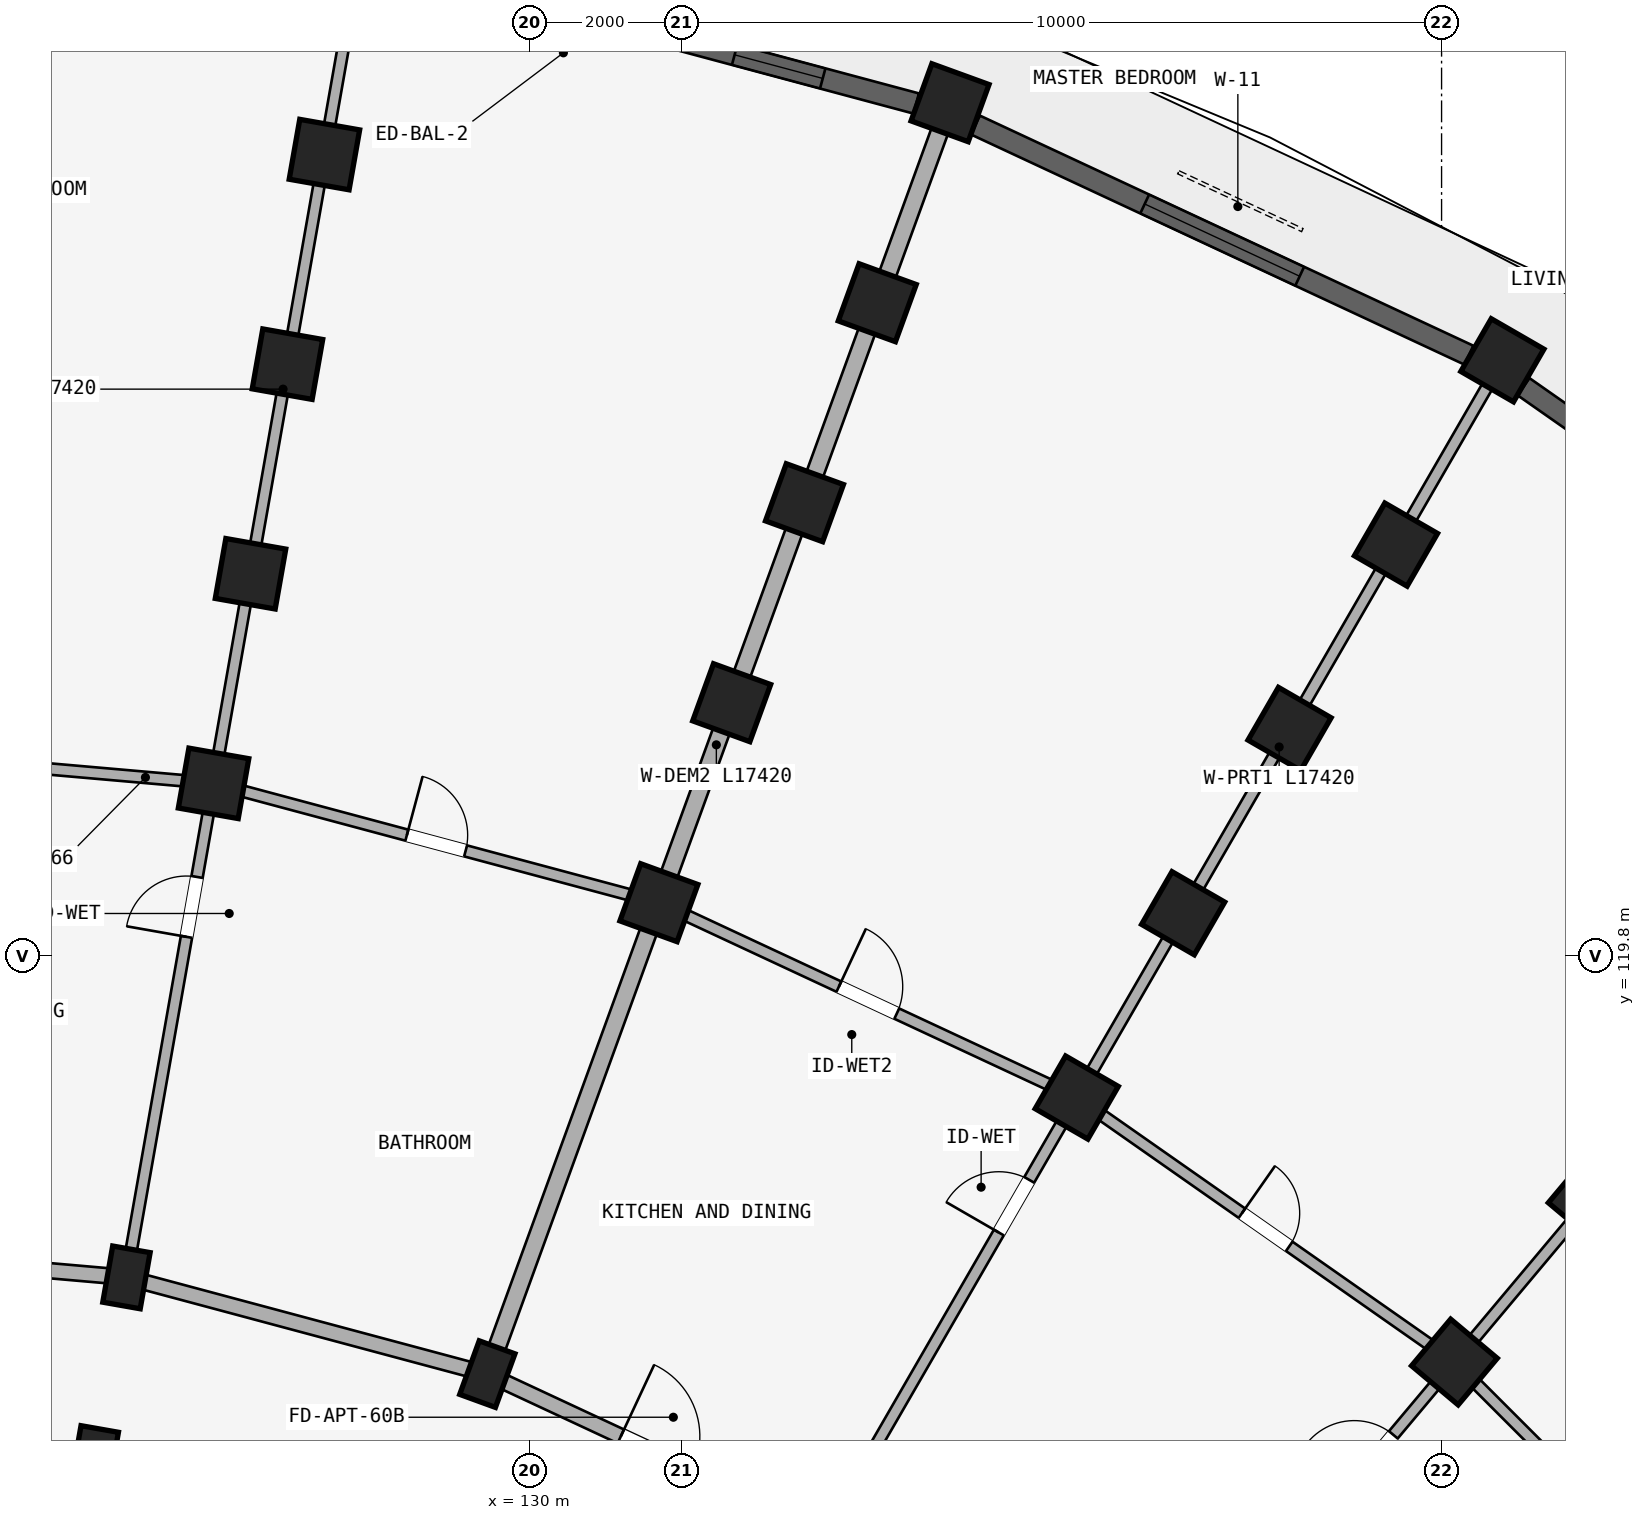
"""IFC4 building model, lengths in metres.
Left out: names, types, materials, properties, quantities, classifications, styles, units other than length and angle.
Written with IfcOpenShell. Run it as: python <this file> out.ifc"""

import sys

from ifc_helpers import new_model, si_unit, direction, frame, frame_2d, origin, origin_2d, place, context, subcontext, project, spatial, rectangle, extrude, element, fill, save


model = new_model("IFC4")
c1 = context("Model", 3, precision=1e-05, world=origin(), true_north=direction((0.0, 1.0)))
c2 = subcontext(c1, "Body", "Model", "MODEL_VIEW")
j1 = project(units=[si_unit("LENGTHUNIT", "METRE"), si_unit("PLANEANGLEUNIT", "RADIAN")], contexts=[c1])
p1 = place(None, origin())
s1 = spatial("IfcSite", under=j1, at=p1, CompositionType="ELEMENT")
p2 = place(p1, origin())
s2 = spatial("IfcBuilding", under=s1, at=p2, CompositionType="ELEMENT")
p3 = place(p2, frame((0.0, 0.0, 8.7)))
s3 = spatial("IfcBuildingStorey", under=s2, at=p3, CompositionType="ELEMENT", Elevation=8.7)
for number, where, z_axis, x_axis in (
    (1, (124.28, 113.208, 0.0), (0.0, 0.0, 1.0), (-0.985, 0.174, 0.0)),
    (2, (124.697, 115.572, 0.0), (0.0, 0.0, 1.0), (-0.985, 0.174, 0.0)),
):
    element("IfcColumn", number, at=place(p3, frame(where, z_axis=z_axis, x_axis=x_axis)), inside=s3, PredefinedType="COLUMN", context=c2, shape_type="SweptSolid", body=[
        extrude(rectangle(XDim=0.5, YDim=0.75, at=origin_2d()), origin(), (0.0, 0.0, 1.0), 2.93),
    ])
for number, where, z_axis, x_axis in (
    (3, (125.843, 122.071, 0.0), (0.0, 0.0, 1.0), (-0.985, 0.174, 0.0)),
    (4, (126.329, 124.829, 0.0), (0.0, 0.0, 1.0), (-0.985, 0.174, 0.0)),
    (5, (126.815, 127.586, 0.0), (0.0, 0.0, 1.0), (-0.985, 0.174, 0.0)),
    (6, (127.302, 130.344, 0.0), (0.0, 0.0, 1.0), (-0.985, 0.174, 0.0)),
):
    element("IfcColumn", number, at=place(p3, frame(where, z_axis=z_axis, x_axis=x_axis)), inside=s3, PredefinedType="COLUMN", context=c2, shape_type="SweptSolid", body=[
        extrude(rectangle(XDim=0.8, YDim=0.8, at=origin_2d()), origin(), (0.0, 0.0, 1.0), 2.93),
    ])
p4 = place(p3, frame((129.445, 114.299, 0.0), z_axis=(0.0, 0.0, 1.0), x_axis=(-0.939692620786, 0.342020143326, 0.0)))
e7 = element("IfcColumn", 7, at=p4, inside=s3, PredefinedType="COLUMN", context=c2, shape_type="SweptSolid", body=[
    extrude(rectangle(XDim=0.5, YDim=0.75, at=origin_2d()), origin(), (0.0, 0.0, 1.0), 2.93),
])
for number, where, z_axis, x_axis in (
    (8, (131.702, 120.501, 0.0), (0.0, 0.0, 1.0), (-0.94, 0.342, 0.0)),
    (9, (132.66, 123.132, 0.0), (0.0, 0.0, 1.0), (-0.94, 0.342, 0.0)),
    (10, (133.618, 125.764, 0.0), (0.0, 0.0, 1.0), (-0.94, 0.342, 0.0)),
    (11, (134.575, 128.395, 0.0), (0.0, 0.0, 1.0), (-0.94, 0.342, 0.0)),
    (12, (135.533, 131.026, 0.0), (0.0, 0.0, 1.0), (-0.94, 0.342, 0.0)),
    (13, (137.2, 117.938, 0.0), (0.0, 0.0, 1.0), (-0.866, 0.5, 0.0)),
    (14, (138.6, 120.363, 0.0), (0.0, 0.0, 1.0), (-0.866, 0.5, 0.0)),
    (15, (140.0, 122.787, 0.0), (0.0, 0.0, 1.0), (-0.866, 0.5, 0.0)),
    (16, (141.4, 125.212, 0.0), (0.0, 0.0, 1.0), (-0.866, 0.5, 0.0)),
    (17, (142.8, 127.637, 0.0), (0.0, 0.0, 1.0), (-0.866, 0.5, 0.0)),
    (18, (142.169, 114.458, 0.0), (0.0, 0.0, 1.0), (-0.766, 0.643, 0.0)),
    (19, (143.969, 116.603, 0.0), (0.0, 0.0, 1.0), (-0.766, 0.643, 0.0)),
):
    element("IfcColumn", number, at=place(p3, frame(where, z_axis=z_axis, x_axis=x_axis)), inside=s3, PredefinedType="COLUMN", context=c2, shape_type="SweptSolid", body=[
        extrude(rectangle(XDim=0.8, YDim=0.8, at=origin_2d()), origin(), (0.0, 0.0, 1.0), 2.93),
    ])
p5 = place(p3, frame((119.8, 113.6, 0.0), z_axis=(0.0, 0.0, 1.0), x_axis=(0.996191949488, -0.087187153726, 0.0)))
e20 = element("IfcWall", 20, at=p5, inside=s3, PredefinedType="STANDARD", context=c2, shape_type="SweptSolid", body=[
    extrude(rectangle(XDim=4.497, YDim=0.2, at=frame_2d((2.249, 0.0))), origin(), (0.0, 0.0, 1.0), 2.372),
])
p6 = place(p5, frame((1.729, 0.0, 0.0)))
e21 = element("IfcOpeningElement", 21, at=p6, cuts=e20, PredefinedType="OPENING", context=c2, shape_type="SweptSolid", body=[
    extrude(rectangle(XDim=1.04, YDim=2.15, at=frame_2d((0.52, 1.075))), frame((0.0, 0.11, 0.0), z_axis=(0.0, -1.0, 0.0), x_axis=(1.0, 0.0, 0.0)), (0.0, 0.0, 1.0), 0.22),
])
p7 = place(p3, frame((119.8, 116.0, 0.0), z_axis=(0.0, 0.0, 1.0), x_axis=(0.996193663584, -0.087167566415, 0.0)))
e22 = element("IfcWall", 22, at=p7, inside=s3, PredefinedType="STANDARD", context=c2, shape_type="SweptSolid", body=[
    extrude(rectangle(XDim=4.916, YDim=0.2, at=frame_2d((2.458, 0.0))), origin(), (0.0, 0.0, 1.0), 2.372),
])
p8 = place(p7, frame((1.958, 0.0, 0.0)))
e23 = element("IfcOpeningElement", 23, at=p8, cuts=e22, PredefinedType="OPENING", context=c2, shape_type="SweptSolid", body=[
    extrude(rectangle(XDim=1.0, YDim=2.15, at=frame_2d((0.5, 1.075))), frame((0.0, 0.11, 0.0), z_axis=(0.0, -1.0, 0.0), x_axis=(1.0, 0.0, 0.0)), (0.0, 0.0, 1.0), 0.22),
])
p9 = place(p3, frame((124.697, 115.572, 0.0), z_axis=(0.0, 0.0, 1.0), x_axis=(0.965930095386, -0.258803112091, 0.0)))
e24 = element("IfcWall", 24, at=p9, inside=s3, PredefinedType="STANDARD", context=c2, shape_type="SweptSolid", body=[
    extrude(rectangle(XDim=4.916, YDim=0.2, at=frame_2d((2.458, 0.0))), origin(), (0.0, 0.0, 1.0), 2.372),
])
p10 = place(p3, frame((129.445, 114.299, 0.0), z_axis=(0.0, 0.0, 1.0), x_axis=(0.906302381024, -0.422629854778, 0.0)))
e25 = element("IfcWall", 25, at=p10, inside=s3, PredefinedType="STANDARD", context=c2, shape_type="SweptSolid", body=[
    extrude(rectangle(XDim=4.915, YDim=0.2, at=frame_2d((2.458, 0.0))), origin(), (0.0, 0.0, 1.0), 2.372),
])
p11 = place(p10, frame((1.938, 0.0, 0.0)))
e26 = element("IfcOpeningElement", 26, at=p11, cuts=e25, PredefinedType="OPENING", context=c2, shape_type="SweptSolid", body=[
    extrude(rectangle(XDim=1.04, YDim=2.15, at=frame_2d((0.52, 1.075))), frame((0.0, 0.11, 0.0), z_axis=(0.0, -1.0, 0.0), x_axis=(1.0, 0.0, 0.0)), (0.0, 0.0, 1.0), 0.22),
])
p12 = place(p3, frame((124.714, 115.67, 0.0), z_axis=(0.0, 0.0, 1.0), x_axis=(0.173646216546, 0.984808098809, 0.0)))
e27 = element("IfcWall", 27, at=p12, inside=s3, PredefinedType="PARTITIONING", context=c2, shape_type="SweptSolid", body=[
    extrude(rectangle(XDim=17.42, YDim=0.15, at=frame_2d((8.71, 0.0))), origin(), (0.0, 0.0, 1.0), 2.372),
])
p13 = place(p12, frame((4.45, 0.0, 0.0)))
e28 = element("IfcOpeningElement", 28, at=p13, cuts=e27, PredefinedType="OPENING", context=c2, shape_type="SweptSolid", body=[
    extrude(rectangle(XDim=0.8, YDim=2.1, at=frame_2d((0.4, 1.05))), frame((0.0, 0.085, 0.0), z_axis=(0.0, -1.0, 0.0), x_axis=(1.0, 0.0, 0.0)), (0.0, 0.0, 1.0), 0.17),
])
p14 = place(p3, frame((129.479, 114.393, 0.0), z_axis=(0.0, 0.0, 1.0), x_axis=(0.342022120477, 0.939691901159, 0.0)))
e29 = element("IfcWall", 29, at=p14, inside=s3, PredefinedType="STANDARD", context=c2, shape_type="SweptSolid", body=[
    extrude(rectangle(XDim=17.42, YDim=0.23, at=frame_2d((8.71, 0.0))), origin(), (0.0, 0.0, 1.0), 2.372),
])
p15 = place(p3, frame((133.95, 112.309, 0.0), z_axis=(0.0, 0.0, 1.0), x_axis=(0.499997843263, 0.866026648973, 0.0)))
e30 = element("IfcWall", 30, at=p15, inside=s3, PredefinedType="PARTITIONING", context=c2, shape_type="SweptSolid", body=[
    extrude(rectangle(XDim=17.42, YDim=0.15, at=frame_2d((8.71, 0.0))), origin(), (0.0, 0.0, 1.0), 2.372),
])
p16 = place(p15, frame((4.45, 0.0, 0.0)))
e31 = element("IfcOpeningElement", 31, at=p16, cuts=e30, PredefinedType="OPENING", context=c2, shape_type="SweptSolid", body=[
    extrude(rectangle(XDim=0.8, YDim=2.1, at=frame_2d((0.4, 1.05))), frame((0.0, 0.085, 0.0), z_axis=(0.0, -1.0, 0.0), x_axis=(1.0, 0.0, 0.0)), (0.0, 0.0, 1.0), 0.17),
])
p17 = place(p3, frame((137.991, 109.479, 0.0), z_axis=(0.0, 0.0, 1.0), x_axis=(0.642784757967, 0.766046835987, 0.0)))
e32 = element("IfcWall", 32, at=p17, inside=s3, PredefinedType="PARTITIONING", context=c2, shape_type="SweptSolid", body=[
    extrude(rectangle(XDim=17.42, YDim=0.15, at=frame_2d((8.71, 0.0))), origin(), (0.0, 0.0, 1.0), 2.372),
])
p18 = place(p17, frame((4.45, 0.0, 0.0)))
e33 = element("IfcOpeningElement", 33, at=p18, cuts=e32, PredefinedType="OPENING", context=c2, shape_type="SweptSolid", body=[
    extrude(rectangle(XDim=0.8, YDim=2.1, at=frame_2d((0.4, 1.05))), frame((0.0, 0.085, 0.0), z_axis=(0.0, -1.0, 0.0), x_axis=(1.0, 0.0, 0.0)), (0.0, 0.0, 1.0), 0.17),
])
p19 = place(p3, frame((141.479, 105.991, 0.0), z_axis=(0.0, 0.0, 1.0), x_axis=(0.766046835987, 0.642784757967, 0.0)))
e34 = element("IfcWall", 34, at=p19, inside=s3, PredefinedType="STANDARD", context=c2, shape_type="SweptSolid", body=[
    extrude(rectangle(XDim=17.42, YDim=0.23, at=frame_2d((8.71, 0.0))), origin(), (0.0, 0.0, 1.0), 2.372),
])
p20 = place(p3, frame((119.8, 122.6, 0.0), z_axis=(0.0, 0.0, 1.0), x_axis=(0.996193018494, -0.087174938512, 0.0)))
e35 = element("IfcWall", 35, at=p20, inside=s3, PredefinedType="PLUMBINGWALL", context=c2, shape_type="SweptSolid", body=[
    extrude(rectangle(XDim=6.066, YDim=0.15, at=frame_2d((3.033, 0.0))), origin(), (0.0, 0.0, 1.0), 2.372),
])
p21 = place(p20, frame((2.653, 0.0, 0.0)))
e36 = element("IfcOpeningElement", 36, at=p21, cuts=e35, PredefinedType="OPENING", context=c2, shape_type="SweptSolid", body=[
    extrude(rectangle(XDim=0.76, YDim=2.05, at=frame_2d((0.38, 1.025))), frame((0.0, 0.085, 0.0), z_axis=(0.0, -1.0, 0.0), x_axis=(1.0, 0.0, 0.0)), (0.0, 0.0, 1.0), 0.17),
])
p22 = place(p3, frame((125.843, 122.071, 0.0), z_axis=(0.0, 0.0, 1.0), x_axis=(0.965923618901, -0.258827283048, 0.0)))
e37 = element("IfcWall", 37, at=p22, inside=s3, PredefinedType="PLUMBINGWALL", context=c2, shape_type="SweptSolid", body=[
    extrude(rectangle(XDim=6.066, YDim=0.15, at=frame_2d((3.033, 0.0))), origin(), (0.0, 0.0, 1.0), 2.372),
])
p23 = place(p22, frame((2.633, 0.0, 0.0)))
e38 = element("IfcOpeningElement", 38, at=p23, cuts=e37, PredefinedType="OPENING", context=c2, shape_type="SweptSolid", body=[
    extrude(rectangle(XDim=0.8, YDim=2.1, at=frame_2d((0.4, 1.05))), frame((0.0, 0.085, 0.0), z_axis=(0.0, -1.0, 0.0), x_axis=(1.0, 0.0, 0.0)), (0.0, 0.0, 1.0), 0.17),
])
p24 = place(p3, frame((131.702, 120.501, 0.0), z_axis=(0.0, 0.0, 1.0), x_axis=(0.906312656069, -0.42260781991, 0.0)))
e39 = element("IfcWall", 39, at=p24, inside=s3, PredefinedType="PLUMBINGWALL", context=c2, shape_type="SweptSolid", body=[
    extrude(rectangle(XDim=6.066, YDim=0.15, at=frame_2d((3.033, 0.0))), origin(), (0.0, 0.0, 1.0), 2.372),
])
p25 = place(p24, frame((2.613, 0.0, 0.0)))
e40 = element("IfcOpeningElement", 40, at=p25, cuts=e39, PredefinedType="OPENING", context=c2, shape_type="SweptSolid", body=[
    extrude(rectangle(XDim=0.84, YDim=2.1, at=frame_2d((0.42, 1.05))), frame((0.0, 0.085, 0.0), z_axis=(0.0, -1.0, 0.0), x_axis=(1.0, 0.0, 0.0)), (0.0, 0.0, 1.0), 0.17),
])
p26 = place(p3, frame((137.2, 117.938, 0.0), z_axis=(0.0, 0.0, 1.0), x_axis=(0.81913926159, -0.573594691504, 0.0)))
e41 = element("IfcWall", 41, at=p26, inside=s3, PredefinedType="PLUMBINGWALL", context=c2, shape_type="SweptSolid", body=[
    extrude(rectangle(XDim=6.066, YDim=0.15, at=frame_2d((3.033, 0.0))), origin(), (0.0, 0.0, 1.0), 2.372),
])
p27 = place(p26, frame((2.653, 0.0, 0.0)))
e42 = element("IfcOpeningElement", 42, at=p27, cuts=e41, PredefinedType="OPENING", context=c2, shape_type="SweptSolid", body=[
    extrude(rectangle(XDim=0.76, YDim=2.05, at=frame_2d((0.38, 1.025))), frame((0.0, 0.085, 0.0), z_axis=(0.0, -1.0, 0.0), x_axis=(1.0, 0.0, 0.0)), (0.0, 0.0, 1.0), 0.17),
])
p28 = place(p3, frame((142.169, 114.458, 0.0), z_axis=(0.0, 0.0, 1.0), x_axis=(0.707106781187, -0.707106781187, 0.0)))
e43 = element("IfcWall", 43, at=p28, inside=s3, PredefinedType="PLUMBINGWALL", context=c2, shape_type="SweptSolid", body=[
    extrude(rectangle(XDim=6.066, YDim=0.15, at=frame_2d((3.033, 0.0))), origin(), (0.0, 0.0, 1.0), 2.372),
])
p29 = place(p28, frame((2.633, 0.0, 0.0)))
e44 = element("IfcOpeningElement", 44, at=p29, cuts=e43, PredefinedType="OPENING", context=c2, shape_type="SweptSolid", body=[
    extrude(rectangle(XDim=0.8, YDim=2.1, at=frame_2d((0.4, 1.05))), frame((0.0, 0.085, 0.0), z_axis=(0.0, -1.0, 0.0), x_axis=(1.0, 0.0, 0.0)), (0.0, 0.0, 1.0), 0.17),
])
p30 = place(p3, frame((128.168, 132.87, 0.0), z_axis=(0.0, 0.0, 1.0), x_axis=(0.965923712619, -0.258826933296, 0.0)))
e45 = element("IfcWall", 45, at=p30, inside=s3, PredefinedType="STANDARD", context=c2, shape_type="SweptSolid", body=[
    extrude(rectangle(XDim=7.164, YDim=0.275, at=frame_2d((3.582, 0.0))), origin(), (0.0, 0.0, 1.0), 2.472),
])
p31 = place(p30, frame((4.69, 0.0, 0.522)))
e46 = element("IfcOpeningElement", 46, at=p31, cuts=e45, PredefinedType="OPENING", context=c2, shape_type="SweptSolid", body=[
    extrude(rectangle(XDim=1.2, YDim=1.5, at=frame_2d((0.6, 0.75))), frame((0.0, 0.147, 0.0), z_axis=(0.0, -1.0, 0.0), x_axis=(1.0, 0.0, 0.0)), (0.0, 0.0, 1.0), 0.295),
])
p32 = place(p30, frame((1.877, 0.0, 0.0)))
e47 = element("IfcOpeningElement", 47, at=p32, cuts=e45, PredefinedType="OPENING", context=c2, shape_type="SweptSolid", body=[
    extrude(rectangle(XDim=1.26, YDim=2.15, at=frame_2d((0.63, 1.075))), frame((0.0, 0.147, 0.0), z_axis=(0.0, -1.0, 0.0), x_axis=(1.0, 0.0, 0.0)), (0.0, 0.0, 1.0), 0.295),
])
p33 = place(p3, frame((135.867, 130.732, 0.0), z_axis=(0.0, 0.0, 1.0), x_axis=(0.906300636296, -0.422633596215, 0.0)))
e48 = element("IfcWall", 48, at=p33, inside=s3, PredefinedType="STANDARD", context=c2, shape_type="SweptSolid", body=[
    extrude(rectangle(XDim=7.164, YDim=0.275, at=frame_2d((3.582, 0.0))), origin(), (0.0, 0.0, 1.0), 2.472),
])
p34 = place(p33, frame((2.457, 0.0, 0.322)))
e49 = element("IfcOpeningElement", 49, at=p34, cuts=e48, PredefinedType="OPENING", context=c2, shape_type="SweptSolid", body=[
    extrude(rectangle(XDim=2.25, YDim=1.95, at=frame_2d((1.125, 0.975))), frame((0.0, 0.147, 0.0), z_axis=(0.0, -1.0, 0.0), x_axis=(1.0, 0.0, 0.0)), (0.0, 0.0, 1.0), 0.295),
])
p35 = place(p3, frame((143.078, 127.29, 0.0), z_axis=(0.0, 0.0, 1.0), x_axis=(0.819161471697, -0.573562972382, 0.0)))
e50 = element("IfcWall", 50, at=p35, inside=s3, PredefinedType="STANDARD", context=c2, shape_type="SweptSolid", body=[
    extrude(rectangle(XDim=7.164, YDim=0.275, at=frame_2d((3.582, 0.0))), origin(), (0.0, 0.0, 1.0), 2.472),
])
p36 = place(p35, frame((2.532, 0.0, 0.472)))
e51 = element("IfcOpeningElement", 51, at=p36, cuts=e50, PredefinedType="OPENING", context=c2, shape_type="SweptSolid", body=[
    extrude(rectangle(XDim=2.1, YDim=1.8, at=frame_2d((1.05, 0.9))), frame((0.0, 0.147, 0.0), z_axis=(0.0, -1.0, 0.0), x_axis=(1.0, 0.0, 0.0)), (0.0, 0.0, 1.0), 0.295),
])
p37 = place(p31, origin())
e52 = element("IfcWindow", 52, at=p37, inside=s3, PartitioningType="SINGLE_PANEL", PredefinedType="WINDOW", context=c2, shape_type="SweptSolid", body=[
    extrude(rectangle(XDim=1.2, YDim=1.5, at=frame_2d((0.6, 0.75))), frame((0.0, 0.03, 0.0), z_axis=(0.0, -1.0, 0.0), x_axis=(1.0, 0.0, 0.0)), (0.0, 0.0, 1.0), 0.06),
])
fill(e46, e52)
p38 = place(p34, origin())
e53 = element("IfcWindow", 53, at=p38, inside=s3, PartitioningType="TRIPLE_PANEL_VERTICAL", PredefinedType="WINDOW", context=c2, shape_type="SweptSolid", body=[
    extrude(rectangle(XDim=2.25, YDim=1.95, at=frame_2d((1.125, 0.975))), frame((0.0, 0.03, 0.0), z_axis=(0.0, -1.0, 0.0), x_axis=(1.0, 0.0, 0.0)), (0.0, 0.0, 1.0), 0.06),
])
fill(e49, e53)
p39 = place(p13, origin())
e54 = element("IfcDoor", 54, at=p39, inside=s3, OperationType="SINGLE_SWING_LEFT", PredefinedType="DOOR", context=c2, shape_type="SweptSolid", body=[
    extrude(rectangle(XDim=0.8, YDim=2.1, at=frame_2d((0.4, 1.05))), frame((0.0, 0.025, 0.0), z_axis=(0.0, -1.0, 0.0), x_axis=(1.0, 0.0, 0.0)), (0.0, 0.0, 1.0), 0.05),
])
fill(e28, e54)
p40 = place(p16, frame((0.8, 0.0, 0.0), z_axis=(0.0, 0.0, 1.0), x_axis=(-1.0, 0.0, 0.0)))
e55 = element("IfcDoor", 55, at=p40, inside=s3, OperationType="SINGLE_SWING_RIGHT", PredefinedType="DOOR", context=c2, shape_type="SweptSolid", body=[
    extrude(rectangle(XDim=0.8, YDim=2.1, at=frame_2d((0.4, 1.05))), frame((0.0, 0.025, 0.0), z_axis=(0.0, -1.0, 0.0), x_axis=(1.0, 0.0, 0.0)), (0.0, 0.0, 1.0), 0.05),
])
fill(e31, e55)
p41 = place(p18, origin())
e56 = element("IfcDoor", 56, at=p41, inside=s3, OperationType="SINGLE_SWING_LEFT", PredefinedType="DOOR", context=c2, shape_type="SweptSolid", body=[
    extrude(rectangle(XDim=0.8, YDim=2.1, at=frame_2d((0.4, 1.05))), frame((0.0, 0.025, 0.0), z_axis=(0.0, -1.0, 0.0), x_axis=(1.0, 0.0, 0.0)), (0.0, 0.0, 1.0), 0.05),
])
fill(e33, e56)
p42 = place(p23, origin())
e57 = element("IfcDoor", 57, at=p42, inside=s3, OperationType="SINGLE_SWING_LEFT", PredefinedType="DOOR", context=c2, shape_type="SweptSolid", body=[
    extrude(rectangle(XDim=0.8, YDim=2.1, at=frame_2d((0.4, 1.05))), frame((0.0, 0.025, 0.0), z_axis=(0.0, -1.0, 0.0), x_axis=(1.0, 0.0, 0.0)), (0.0, 0.0, 1.0), 0.05),
])
fill(e38, e57)
p43 = place(p11, frame((1.04, 0.0, 0.0), z_axis=(0.0, 0.0, 1.0), x_axis=(-1.0, 0.0, 0.0)))
e58 = element("IfcDoor", 58, at=p43, inside=s3, OperationType="SINGLE_SWING_RIGHT", PredefinedType="DOOR", context=c2, shape_type="SweptSolid", body=[
    extrude(rectangle(XDim=1.04, YDim=2.15, at=frame_2d((0.52, 1.075))), frame((0.0, 0.025, 0.0), z_axis=(0.0, -1.0, 0.0), x_axis=(1.0, 0.0, 0.0)), (0.0, 0.0, 1.0), 0.05),
])
fill(e26, e58)
p44 = place(p25, origin())
e59 = element("IfcDoor", 59, at=p44, inside=s3, OperationType="SINGLE_SWING_LEFT", PredefinedType="DOOR", context=c2, shape_type="SweptSolid", body=[
    extrude(rectangle(XDim=0.84, YDim=2.1, at=frame_2d((0.42, 1.05))), frame((0.0, 0.025, 0.0), z_axis=(0.0, -1.0, 0.0), x_axis=(1.0, 0.0, 0.0)), (0.0, 0.0, 1.0), 0.05),
])
fill(e40, e59)
p45 = place(p27, frame((0.76, 0.0, 0.0), z_axis=(0.0, 0.0, 1.0), x_axis=(-1.0, 0.0, 0.0)))
e60 = element("IfcDoor", 60, at=p45, inside=s3, OperationType="SINGLE_SWING_RIGHT", PredefinedType="DOOR", context=c2, shape_type="SweptSolid", body=[
    extrude(rectangle(XDim=0.76, YDim=2.05, at=frame_2d((0.38, 1.025))), frame((0.0, 0.025, 0.0), z_axis=(0.0, -1.0, 0.0), x_axis=(1.0, 0.0, 0.0)), (0.0, 0.0, 1.0), 0.05),
])
fill(e42, e60)
save(model, sys.argv[1])
